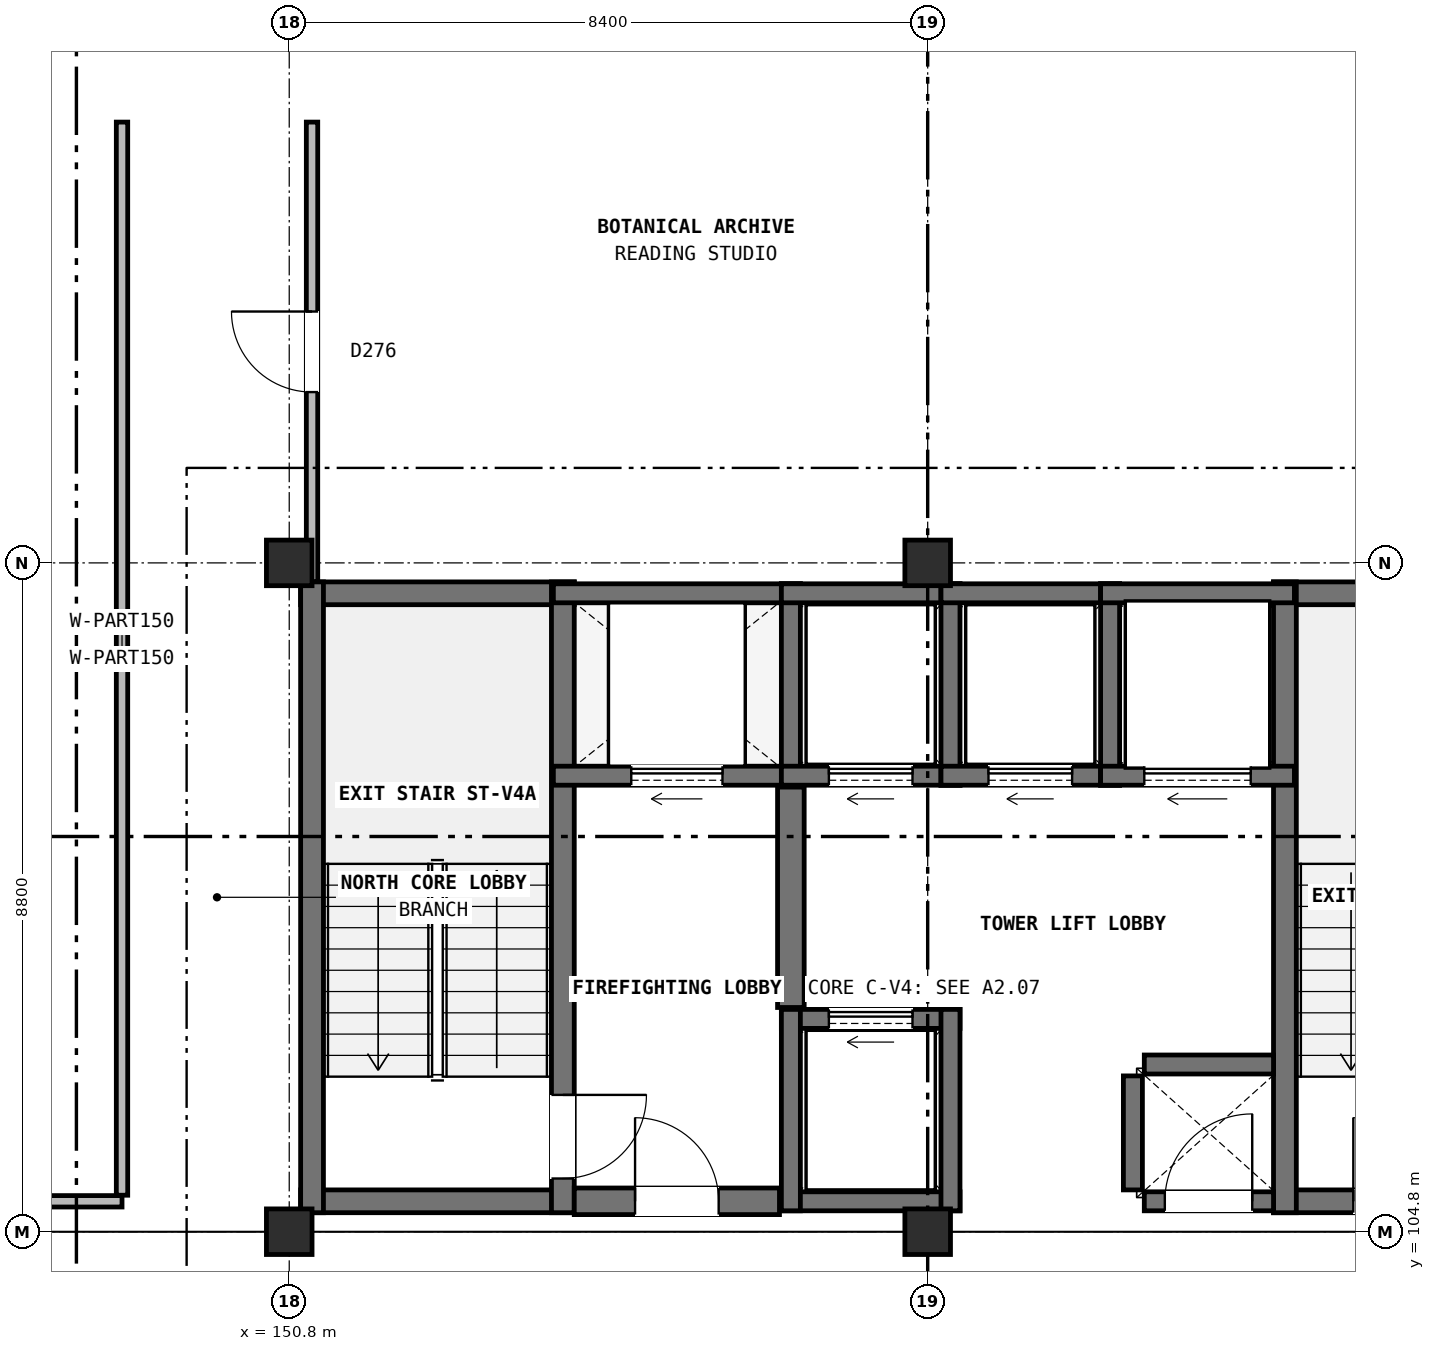
"""IFC4 building model, lengths in metres.
Left out: names, types, materials, properties, quantities, classifications, styles, units other than length and angle.
Written with IfcOpenShell. Run it as: python <this file> out.ifc"""

import sys

from ifc_helpers import new_model, si_unit, direction, frame, frame_2d, origin, origin_2d, place, context, subcontext, project, spatial, rectangle, extrude, element, fill, save


model = new_model("IFC4")
c1 = context("Model", 3, precision=1e-05, world=origin(), true_north=direction((0.0, 1.0)))
c2 = subcontext(c1, "Body", "Model", "MODEL_VIEW")
j1 = project(units=[si_unit("LENGTHUNIT", "METRE"), si_unit("PLANEANGLEUNIT", "RADIAN")], contexts=[c1])
p1 = place(None, origin())
s1 = spatial("IfcSite", under=j1, at=p1, CompositionType="ELEMENT")
p2 = place(p1, origin())
s2 = spatial("IfcBuilding", under=s1, at=p2, CompositionType="ELEMENT")
p3 = place(p2, frame((0.0, 0.0, 56.0)))
s3 = spatial("IfcBuildingStorey", under=s2, at=p3, CompositionType="ELEMENT", Elevation=56.0)
for number, where, z_axis, x_axis in (
    (1, (150.8, 104.8, 0.0), (0.0, 0.0, 1.0), (1.0, 0.0, 0.0)),
    (2, (150.8, 113.6, 0.0), (0.0, 0.0, 1.0), (1.0, 0.0, 0.0)),
    (3, (159.2, 104.8, 0.0), (0.0, 0.0, 1.0), (1.0, 0.0, 0.0)),
    (4, (159.2, 113.6, 0.0), (0.0, 0.0, 1.0), (1.0, 0.0, 0.0)),
):
    element("IfcColumn", number, at=place(p3, frame(where, z_axis=z_axis, x_axis=x_axis)), inside=s3, PredefinedType="COLUMN", context=c2, shape_type="SweptSolid", body=[
        extrude(rectangle(XDim=0.6, YDim=0.6, at=origin_2d()), origin(), (0.0, 0.0, 1.0), 3.8),
    ])
for number, where, z_axis, x_axis in (
    (5, (150.95, 105.2, 0.0), (0.0, 0.0, 1.0), (1.0, 0.0, 0.0)),
    (6, (150.95, 113.2, 0.0), (0.0, 0.0, 1.0), (1.0, 0.0, 0.0)),
):
    element("IfcWall", number, at=place(p3, frame(where, z_axis=z_axis, x_axis=x_axis)), inside=s3, PredefinedType="SHEAR", context=c2, shape_type="SweptSolid", body=[
        extrude(rectangle(XDim=3.6, YDim=0.3, at=frame_2d((1.8, 0.0))), origin(), (0.0, 0.0, 1.0), 3.8),
    ])
p4 = place(p3, frame((151.1, 105.05, 0.0), z_axis=(0.0, 0.0, 1.0), x_axis=(0.0, 1.0, 0.0)))
e7 = element("IfcWall", 7, at=p4, inside=s3, PredefinedType="SHEAR", context=c2, shape_type="SweptSolid", body=[
    extrude(rectangle(XDim=8.3, YDim=0.3, at=frame_2d((4.15, 0.0))), origin(), (0.0, 0.0, 1.0), 3.8),
])
p5 = place(p3, frame((154.4, 105.05, 0.0), z_axis=(0.0, 0.0, 1.0), x_axis=(0.0, 1.0, 0.0)))
e8 = element("IfcWall", 8, at=p5, inside=s3, PredefinedType="SHEAR", context=c2, shape_type="SweptSolid", body=[
    extrude(rectangle(XDim=8.3, YDim=0.3, at=frame_2d((4.15, 0.0))), origin(), (0.0, 0.0, 1.0), 3.8),
])
p6 = place(p5, frame((0.45, 0.0, 0.0)))
e9 = element("IfcOpeningElement", 9, at=p6, cuts=e8, PredefinedType="OPENING", context=c2, shape_type="SweptSolid", body=[
    extrude(rectangle(XDim=1.1, YDim=2.2, at=frame_2d((0.55, 1.1))), frame((0.0, 0.16, 0.0), z_axis=(0.0, -1.0, 0.0), x_axis=(1.0, 0.0, 0.0)), (0.0, 0.0, 1.0), 0.32),
])
p7 = place(p3, frame((163.75, 105.2, 0.0), z_axis=(0.0, 0.0, 1.0), x_axis=(1.0, 0.0, 0.0)))
e10 = element("IfcWall", 10, at=p7, inside=s3, PredefinedType="SHEAR", context=c2, shape_type="SweptSolid", body=[
    extrude(rectangle(XDim=3.6, YDim=0.3, at=frame_2d((1.8, 0.0))), origin(), (0.0, 0.0, 1.0), 3.8),
])
p8 = place(p7, frame((1.05, 0.0, 0.0)))
e11 = element("IfcOpeningElement", 11, at=p8, cuts=e10, PredefinedType="OPENING", context=c2, shape_type="SweptSolid", body=[
    extrude(rectangle(XDim=1.1, YDim=2.2, at=frame_2d((0.55, 1.1))), frame((0.0, 0.16, 0.0), z_axis=(0.0, -1.0, 0.0), x_axis=(1.0, 0.0, 0.0)), (0.0, 0.0, 1.0), 0.32),
])
p9 = place(p3, frame((163.75, 113.2, 0.0), z_axis=(0.0, 0.0, 1.0), x_axis=(1.0, 0.0, 0.0)))
e12 = element("IfcWall", 12, at=p9, inside=s3, PredefinedType="SHEAR", context=c2, shape_type="SweptSolid", body=[
    extrude(rectangle(XDim=3.6, YDim=0.3, at=frame_2d((1.8, 0.0))), origin(), (0.0, 0.0, 1.0), 3.8),
])
p10 = place(p3, frame((163.9, 105.05, 0.0), z_axis=(0.0, 0.0, 1.0), x_axis=(0.0, 1.0, 0.0)))
e13 = element("IfcWall", 13, at=p10, inside=s3, PredefinedType="SHEAR", context=c2, shape_type="SweptSolid", body=[
    extrude(rectangle(XDim=8.3, YDim=0.3, at=frame_2d((4.15, 0.0))), origin(), (0.0, 0.0, 1.0), 3.8),
])
p11 = place(p3, frame((154.275, 110.8, 0.0), z_axis=(0.0, 0.0, 1.0), x_axis=(1.0, 0.0, 0.0)))
e14 = element("IfcWall", 14, at=p11, inside=s3, PredefinedType="SOLIDWALL", context=c2, shape_type="SweptSolid", body=[
    extrude(rectangle(XDim=3.25, YDim=0.25, at=frame_2d((1.625, 0.0))), origin(), (0.0, 0.0, 1.0), 3.48),
])
p12 = place(p11, frame((1.025, 0.0, 0.0)))
e15 = element("IfcOpeningElement", 15, at=p12, cuts=e14, PredefinedType="OPENING", context=c2, shape_type="SweptSolid", body=[
    extrude(rectangle(XDim=1.2, YDim=2.2, at=frame_2d((0.6, 1.1))), frame((0.0, 0.135, 0.0), z_axis=(0.0, -1.0, 0.0), x_axis=(1.0, 0.0, 0.0)), (0.0, 0.0, 1.0), 0.27),
])
p13 = place(p3, frame((154.275, 113.2, 0.0), z_axis=(0.0, 0.0, 1.0), x_axis=(1.0, 0.0, 0.0)))
e16 = element("IfcWall", 16, at=p13, inside=s3, PredefinedType="SOLIDWALL", context=c2, shape_type="SweptSolid", body=[
    extrude(rectangle(XDim=3.25, YDim=0.25, at=frame_2d((1.625, 0.0))), origin(), (0.0, 0.0, 1.0), 3.48),
])
p14 = place(p3, frame((157.4, 110.675, 0.0), z_axis=(0.0, 0.0, 1.0), x_axis=(0.0, 1.0, 0.0)))
e17 = element("IfcWall", 17, at=p14, inside=s3, PredefinedType="SOLIDWALL", context=c2, shape_type="SweptSolid", body=[
    extrude(rectangle(XDim=2.65, YDim=0.25, at=frame_2d((1.325, 0.0))), origin(), (0.0, 0.0, 1.0), 3.48),
])
p15 = place(p3, frame((157.275, 110.8, 0.0), z_axis=(0.0, 0.0, 1.0), x_axis=(1.0, 0.0, 0.0)))
e18 = element("IfcWall", 18, at=p15, inside=s3, PredefinedType="SOLIDWALL", context=c2, shape_type="SweptSolid", body=[
    extrude(rectangle(XDim=2.35, YDim=0.25, at=frame_2d((1.175, 0.0))), origin(), (0.0, 0.0, 1.0), 3.48),
])
p16 = place(p15, frame((0.625, 0.0, 0.0)))
e19 = element("IfcOpeningElement", 19, at=p16, cuts=e18, PredefinedType="OPENING", context=c2, shape_type="SweptSolid", body=[
    extrude(rectangle(XDim=1.1, YDim=2.2, at=frame_2d((0.55, 1.1))), frame((0.0, 0.135, 0.0), z_axis=(0.0, -1.0, 0.0), x_axis=(1.0, 0.0, 0.0)), (0.0, 0.0, 1.0), 0.27),
])
p17 = place(p3, frame((157.275, 113.2, 0.0), z_axis=(0.0, 0.0, 1.0), x_axis=(1.0, 0.0, 0.0)))
e20 = element("IfcWall", 20, at=p17, inside=s3, PredefinedType="SOLIDWALL", context=c2, shape_type="SweptSolid", body=[
    extrude(rectangle(XDim=2.35, YDim=0.25, at=frame_2d((1.175, 0.0))), origin(), (0.0, 0.0, 1.0), 3.48),
])
p18 = place(p3, frame((159.5, 110.675, 0.0), z_axis=(0.0, 0.0, 1.0), x_axis=(0.0, 1.0, 0.0)))
e21 = element("IfcWall", 21, at=p18, inside=s3, PredefinedType="SOLIDWALL", context=c2, shape_type="SweptSolid", body=[
    extrude(rectangle(XDim=2.65, YDim=0.25, at=frame_2d((1.325, 0.0))), origin(), (0.0, 0.0, 1.0), 3.48),
])
p19 = place(p3, frame((159.375, 110.8, 0.0), z_axis=(0.0, 0.0, 1.0), x_axis=(1.0, 0.0, 0.0)))
e22 = element("IfcWall", 22, at=p19, inside=s3, PredefinedType="SOLIDWALL", context=c2, shape_type="SweptSolid", body=[
    extrude(rectangle(XDim=2.35, YDim=0.25, at=frame_2d((1.175, 0.0))), origin(), (0.0, 0.0, 1.0), 3.48),
])
p20 = place(p19, frame((0.625, 0.0, 0.0)))
e23 = element("IfcOpeningElement", 23, at=p20, cuts=e22, PredefinedType="OPENING", context=c2, shape_type="SweptSolid", body=[
    extrude(rectangle(XDim=1.1, YDim=2.2, at=frame_2d((0.55, 1.1))), frame((0.0, 0.135, 0.0), z_axis=(0.0, -1.0, 0.0), x_axis=(1.0, 0.0, 0.0)), (0.0, 0.0, 1.0), 0.27),
])
p21 = place(p3, frame((159.375, 113.2, 0.0), z_axis=(0.0, 0.0, 1.0), x_axis=(1.0, 0.0, 0.0)))
e24 = element("IfcWall", 24, at=p21, inside=s3, PredefinedType="SOLIDWALL", context=c2, shape_type="SweptSolid", body=[
    extrude(rectangle(XDim=2.35, YDim=0.25, at=frame_2d((1.175, 0.0))), origin(), (0.0, 0.0, 1.0), 3.48),
])
p22 = place(p3, frame((161.6, 110.675, 0.0), z_axis=(0.0, 0.0, 1.0), x_axis=(0.0, 1.0, 0.0)))
e25 = element("IfcWall", 25, at=p22, inside=s3, PredefinedType="SOLIDWALL", context=c2, shape_type="SweptSolid", body=[
    extrude(rectangle(XDim=2.65, YDim=0.25, at=frame_2d((1.325, 0.0))), origin(), (0.0, 0.0, 1.0), 3.48),
])
p23 = place(p3, frame((157.275, 105.2, 0.0), z_axis=(0.0, 0.0, 1.0), x_axis=(1.0, 0.0, 0.0)))
e26 = element("IfcWall", 26, at=p23, inside=s3, PredefinedType="SOLIDWALL", context=c2, shape_type="SweptSolid", body=[
    extrude(rectangle(XDim=2.35, YDim=0.25, at=frame_2d((1.175, 0.0))), origin(), (0.0, 0.0, 1.0), 3.48),
])
p24 = place(p3, frame((157.275, 107.6, 0.0), z_axis=(0.0, 0.0, 1.0), x_axis=(1.0, 0.0, 0.0)))
e27 = element("IfcWall", 27, at=p24, inside=s3, PredefinedType="SOLIDWALL", context=c2, shape_type="SweptSolid", body=[
    extrude(rectangle(XDim=2.35, YDim=0.25, at=frame_2d((1.175, 0.0))), origin(), (0.0, 0.0, 1.0), 3.48),
])
p25 = place(p24, frame((0.625, 0.0, 0.0)))
e28 = element("IfcOpeningElement", 28, at=p25, cuts=e27, PredefinedType="OPENING", context=c2, shape_type="SweptSolid", body=[
    extrude(rectangle(XDim=1.1, YDim=2.2, at=frame_2d((0.55, 1.1))), frame((0.0, 0.135, 0.0), z_axis=(0.0, -1.0, 0.0), x_axis=(1.0, 0.0, 0.0)), (0.0, 0.0, 1.0), 0.27),
])
for number, where, z_axis, x_axis in (
    (29, (157.4, 105.075, 0.0), (0.0, 0.0, 1.0), (0.0, 1.0, 0.0)),
    (30, (159.5, 105.075, 0.0), (0.0, 0.0, 1.0), (0.0, 1.0, 0.0)),
):
    element("IfcWall", number, at=place(p3, frame(where, z_axis=z_axis, x_axis=x_axis)), inside=s3, PredefinedType="SOLIDWALL", context=c2, shape_type="SweptSolid", body=[
        extrude(rectangle(XDim=2.65, YDim=0.25, at=frame_2d((1.325, 0.0))), origin(), (0.0, 0.0, 1.0), 3.48),
    ])
p26 = place(p3, frame((161.475, 110.8, 0.0), z_axis=(0.0, 0.0, 1.0), x_axis=(1.0, 0.0, 0.0)))
e31 = element("IfcWall", 31, at=p26, inside=s3, PredefinedType="SOLIDWALL", context=c2, shape_type="SweptSolid", body=[
    extrude(rectangle(XDim=2.55, YDim=0.25, at=frame_2d((1.275, 0.0))), origin(), (0.0, 0.0, 1.0), 3.48),
])
p27 = place(p26, frame((0.575, 0.0, 0.0)))
e32 = element("IfcOpeningElement", 32, at=p27, cuts=e31, PredefinedType="OPENING", context=c2, shape_type="SweptSolid", body=[
    extrude(rectangle(XDim=1.4, YDim=2.3, at=frame_2d((0.7, 1.15))), frame((0.0, 0.135, 0.0), z_axis=(0.0, -1.0, 0.0), x_axis=(1.0, 0.0, 0.0)), (0.0, 0.0, 1.0), 0.27),
])
p28 = place(p3, frame((161.475, 113.2, 0.0), z_axis=(0.0, 0.0, 1.0), x_axis=(1.0, 0.0, 0.0)))
e33 = element("IfcWall", 33, at=p28, inside=s3, PredefinedType="SOLIDWALL", context=c2, shape_type="SweptSolid", body=[
    extrude(rectangle(XDim=2.55, YDim=0.25, at=frame_2d((1.275, 0.0))), origin(), (0.0, 0.0, 1.0), 3.48),
])
p29 = place(p3, frame((157.4, 107.75, 0.0), z_axis=(0.0, 0.0, 1.0), x_axis=(0.0, 1.0, 0.0)))
e34 = element("IfcWall", 34, at=p29, inside=s3, PredefinedType="SHEAR", context=c2, shape_type="SweptSolid", body=[
    extrude(rectangle(XDim=2.9, YDim=0.35, at=frame_2d((1.45, 0.0))), origin(), (0.0, 0.0, 1.0), 3.48),
])
p30 = place(p3, frame((154.55, 105.2, 0.0), z_axis=(0.0, 0.0, 1.0), x_axis=(1.0, 0.0, 0.0)))
e35 = element("IfcWall", 35, at=p30, inside=s3, PredefinedType="SHEAR", context=c2, shape_type="SweptSolid", body=[
    extrude(rectangle(XDim=2.7, YDim=0.35, at=frame_2d((1.35, 0.0))), origin(), (0.0, 0.0, 1.0), 3.48),
])
p31 = place(p30, frame((0.8, 0.0, 0.0)))
e36 = element("IfcOpeningElement", 36, at=p31, cuts=e35, PredefinedType="OPENING", context=c2, shape_type="SweptSolid", body=[
    extrude(rectangle(XDim=1.1, YDim=2.2, at=frame_2d((0.55, 1.1))), frame((0.0, 0.185, 0.0), z_axis=(0.0, -1.0, 0.0), x_axis=(1.0, 0.0, 0.0)), (0.0, 0.0, 1.0), 0.37),
])
p32 = place(p3, frame((161.9, 105.35, 0.0), z_axis=(0.0, 0.0, 1.0), x_axis=(0.0, 1.0, 0.0)))
e37 = element("IfcWall", 37, at=p32, inside=s3, PredefinedType="SOLIDWALL", context=c2, shape_type="SweptSolid", body=[
    extrude(rectangle(XDim=1.5, YDim=0.25, at=frame_2d((0.75, 0.0))), origin(), (0.0, 0.0, 1.0), 3.48),
])
p33 = place(p3, frame((162.05, 107.0, 0.0), z_axis=(0.0, 0.0, 1.0), x_axis=(1.0, 0.0, 0.0)))
e38 = element("IfcWall", 38, at=p33, inside=s3, PredefinedType="SOLIDWALL", context=c2, shape_type="SweptSolid", body=[
    extrude(rectangle(XDim=1.7, YDim=0.25, at=frame_2d((0.85, 0.0))), origin(), (0.0, 0.0, 1.0), 3.48),
])
p34 = place(p3, frame((162.05, 105.2, 0.0), z_axis=(0.0, 0.0, 1.0), x_axis=(1.0, 0.0, 0.0)))
e39 = element("IfcWall", 39, at=p34, inside=s3, PredefinedType="SOLIDWALL", context=c2, shape_type="SweptSolid", body=[
    extrude(rectangle(XDim=1.7, YDim=0.25, at=frame_2d((0.85, 0.0))), origin(), (0.0, 0.0, 1.0), 3.48),
])
p35 = place(p34, frame((0.27, 0.0, 0.0)))
e40 = element("IfcOpeningElement", 40, at=p35, cuts=e39, PredefinedType="OPENING", context=c2, shape_type="SweptSolid", body=[
    extrude(rectangle(XDim=1.15, YDim=2.2, at=frame_2d((0.575, 1.1))), frame((0.0, 0.135, 0.0), z_axis=(0.0, -1.0, 0.0), x_axis=(1.0, 0.0, 0.0)), (0.0, 0.0, 1.0), 0.27),
])
p36 = place(p3, frame((142.555, 105.2, 0.0), z_axis=(0.0, 0.0, 1.0), x_axis=(1.0, 0.0, 0.0)))
e41 = element("IfcWall", 41, at=p36, inside=s3, PredefinedType="PARTITIONING", context=c2, shape_type="SweptSolid", body=[
    extrude(rectangle(XDim=6.045, YDim=0.15, at=frame_2d((3.022, 0.0))), origin(), (0.0, 0.0, 1.0), 3.045),
])
p37 = place(p36, frame((2.573, 0.0, 0.0)))
e42 = element("IfcOpeningElement", 42, at=p37, cuts=e41, PredefinedType="OPENING", context=c2, shape_type="SweptSolid", body=[
    extrude(rectangle(XDim=0.9, YDim=2.12, at=frame_2d((0.45, 1.06))), frame((0.0, 0.085, 0.0), z_axis=(0.0, -1.0, 0.0), x_axis=(1.0, 0.0, 0.0)), (0.0, 0.0, 1.0), 0.17),
])
p38 = place(p3, frame((148.6, 105.28, 0.0), z_axis=(0.0, 0.0, 1.0), x_axis=(0.0, 1.0, 0.0)))
e43 = element("IfcWall", 43, at=p38, inside=s3, PredefinedType="PARTITIONING", context=c2, shape_type="SweptSolid", body=[
    extrude(rectangle(XDim=14.12, YDim=0.15, at=frame_2d((7.06, 0.0))), origin(), (0.0, 0.0, 1.0), 3.465),
])
p39 = place(p3, frame((151.1, 113.355, 0.0), z_axis=(0.0, 0.0, 1.0), x_axis=(0.0, 1.0, 0.0)))
e44 = element("IfcWall", 44, at=p39, inside=s3, PredefinedType="PARTITIONING", context=c2, shape_type="SweptSolid", body=[
    extrude(rectangle(XDim=6.045, YDim=0.15, at=frame_2d((3.022, 0.0))), origin(), (0.0, 0.0, 1.0), 3.045),
])
p40 = place(p39, frame((2.492, 0.0, 0.0)))
e45 = element("IfcOpeningElement", 45, at=p40, cuts=e44, PredefinedType="OPENING", context=c2, shape_type="SweptSolid", body=[
    extrude(rectangle(XDim=1.06, YDim=2.18, at=frame_2d((0.53, 1.09))), frame((0.0, 0.085, 0.0), z_axis=(0.0, -1.0, 0.0), x_axis=(1.0, 0.0, 0.0)), (0.0, 0.0, 1.0), 0.17),
])
p41 = place(p6, frame((1.1, 0.0, 0.0), z_axis=(0.0, 0.0, 1.0), x_axis=(-1.0, 0.0, 0.0)))
e46 = element("IfcDoor", 46, at=p41, inside=s3, OperationType="SINGLE_SWING_RIGHT", PredefinedType="DOOR", context=c2, shape_type="SweptSolid", body=[
    extrude(rectangle(XDim=1.1, YDim=2.2, at=frame_2d((0.55, 1.1))), frame((0.0, 0.025, 0.0), z_axis=(0.0, -1.0, 0.0), x_axis=(1.0, 0.0, 0.0)), (0.0, 0.0, 1.0), 0.05),
])
fill(e9, e46)
p42 = place(p8, origin())
e47 = element("IfcDoor", 47, at=p42, inside=s3, OperationType="SINGLE_SWING_LEFT", PredefinedType="DOOR", context=c2, shape_type="SweptSolid", body=[
    extrude(rectangle(XDim=1.1, YDim=2.2, at=frame_2d((0.55, 1.1))), frame((0.0, 0.025, 0.0), z_axis=(0.0, -1.0, 0.0), x_axis=(1.0, 0.0, 0.0)), (0.0, 0.0, 1.0), 0.05),
])
fill(e11, e47)
p43 = place(p12, origin())
e48 = element("IfcDoor", 48, at=p43, inside=s3, OperationType="SLIDING_TO_LEFT", PredefinedType="DOOR", context=c2, shape_type="SweptSolid", body=[
    extrude(rectangle(XDim=1.2, YDim=2.2, at=frame_2d((0.6, 1.1))), frame((0.0, 0.025, 0.0), z_axis=(0.0, -1.0, 0.0), x_axis=(1.0, 0.0, 0.0)), (0.0, 0.0, 1.0), 0.05),
])
fill(e15, e48)
p44 = place(p16, origin())
e49 = element("IfcDoor", 49, at=p44, inside=s3, OperationType="SLIDING_TO_LEFT", PredefinedType="DOOR", context=c2, shape_type="SweptSolid", body=[
    extrude(rectangle(XDim=1.1, YDim=2.2, at=frame_2d((0.55, 1.1))), frame((0.0, 0.025, 0.0), z_axis=(0.0, -1.0, 0.0), x_axis=(1.0, 0.0, 0.0)), (0.0, 0.0, 1.0), 0.05),
])
fill(e19, e49)
p45 = place(p20, origin())
e50 = element("IfcDoor", 50, at=p45, inside=s3, OperationType="SLIDING_TO_LEFT", PredefinedType="DOOR", context=c2, shape_type="SweptSolid", body=[
    extrude(rectangle(XDim=1.1, YDim=2.2, at=frame_2d((0.55, 1.1))), frame((0.0, 0.025, 0.0), z_axis=(0.0, -1.0, 0.0), x_axis=(1.0, 0.0, 0.0)), (0.0, 0.0, 1.0), 0.05),
])
fill(e23, e50)
p46 = place(p25, origin())
e51 = element("IfcDoor", 51, at=p46, inside=s3, OperationType="SLIDING_TO_LEFT", PredefinedType="DOOR", context=c2, shape_type="SweptSolid", body=[
    extrude(rectangle(XDim=1.1, YDim=2.2, at=frame_2d((0.55, 1.1))), frame((0.0, 0.025, 0.0), z_axis=(0.0, -1.0, 0.0), x_axis=(1.0, 0.0, 0.0)), (0.0, 0.0, 1.0), 0.05),
])
fill(e28, e51)
p47 = place(p27, origin())
e52 = element("IfcDoor", 52, at=p47, inside=s3, OperationType="SLIDING_TO_LEFT", PredefinedType="DOOR", context=c2, shape_type="SweptSolid", body=[
    extrude(rectangle(XDim=1.4, YDim=2.3, at=frame_2d((0.7, 1.15))), frame((0.0, 0.025, 0.0), z_axis=(0.0, -1.0, 0.0), x_axis=(1.0, 0.0, 0.0)), (0.0, 0.0, 1.0), 0.05),
])
fill(e32, e52)
p48 = place(p31, origin())
e53 = element("IfcDoor", 53, at=p48, inside=s3, OperationType="SINGLE_SWING_LEFT", PredefinedType="DOOR", context=c2, shape_type="SweptSolid", body=[
    extrude(rectangle(XDim=1.1, YDim=2.2, at=frame_2d((0.55, 1.1))), frame((0.0, 0.025, 0.0), z_axis=(0.0, -1.0, 0.0), x_axis=(1.0, 0.0, 0.0)), (0.0, 0.0, 1.0), 0.05),
])
fill(e36, e53)
p49 = place(p35, origin())
e54 = element("IfcDoor", 54, at=p49, inside=s3, OperationType="SINGLE_SWING_RIGHT", PredefinedType="DOOR", context=c2, shape_type="SweptSolid", body=[
    extrude(rectangle(XDim=1.15, YDim=2.2, at=frame_2d((0.575, 1.1))), frame((0.0, 0.025, 0.0), z_axis=(0.0, -1.0, 0.0), x_axis=(1.0, 0.0, 0.0)), (0.0, 0.0, 1.0), 0.05),
])
fill(e40, e54)
p50 = place(p40, origin())
e55 = element("IfcDoor", 55, at=p50, inside=s3, OperationType="SINGLE_SWING_RIGHT", PredefinedType="DOOR", context=c2, shape_type="SweptSolid", body=[
    extrude(rectangle(XDim=1.06, YDim=2.18, at=frame_2d((0.53, 1.09))), frame((0.0, 0.025, 0.0), z_axis=(0.0, -1.0, 0.0), x_axis=(1.0, 0.0, 0.0)), (0.0, 0.0, 1.0), 0.05),
])
fill(e45, e55)
save(model, sys.argv[1])
